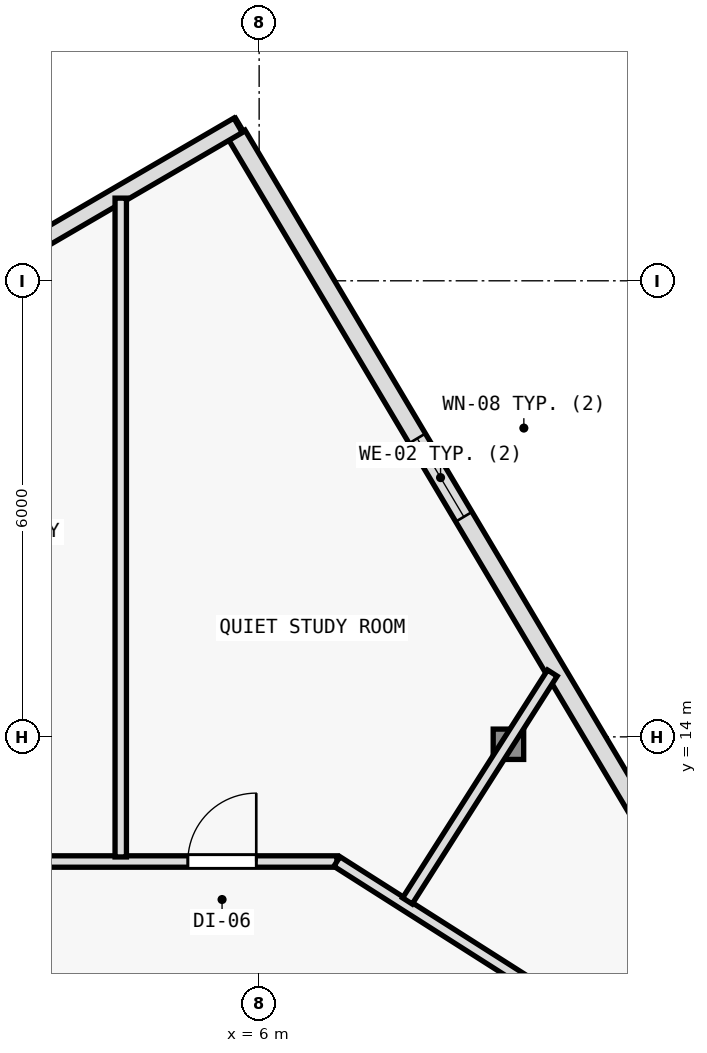
"""IFC4 building model, lengths in metres.
Left out: names, types, materials, properties, quantities, classifications, styles, units other than length and angle.
Written with IfcOpenShell. Run it as: python <this file> out.ifc"""

import sys

from ifc_helpers import new_model, si_unit, direction, frame, frame_2d, origin, origin_2d, place, context, subcontext, project, spatial, rectangle, i_section, extrude, element, fill, save


model = new_model("IFC4")
c1 = context("Model", 3, precision=1e-05, world=origin(), true_north=direction((0.0, 1.0)))
c2 = subcontext(c1, "Body", "Model", "MODEL_VIEW")
j1 = project(units=[si_unit("LENGTHUNIT", "METRE"), si_unit("PLANEANGLEUNIT", "RADIAN")], contexts=[c1])
p1 = place(None, origin())
s1 = spatial("IfcSite", under=j1, at=p1, CompositionType="ELEMENT")
p2 = place(p1, origin())
s2 = spatial("IfcBuilding", under=s1, at=p2, CompositionType="ELEMENT")
p3 = place(p2, frame((0.0, 0.0, 167.4)))
s3 = spatial("IfcBuildingStorey", under=s2, at=p3, CompositionType="ELEMENT", Elevation=167.4)
p4 = place(p3, frame((9.28, 13.903, 0.006), z_axis=(-0.011699840322, -0.002584848443, 0.999928213571), x_axis=(0.215728093413, -0.976453475447, 0.0)))
e1 = element("IfcColumn", 1, at=p4, inside=s3, PredefinedType="COLUMN", context=c2, shape_type="SweptSolid", body=[
    extrude(i_section(OverallWidth=0.401, OverallDepth=0.399, WebThickness=0.016, FlangeThickness=0.025, FilletRadius=0.015, at=origin_2d()), origin(), (0.0, 0.0, 1.0), 3.589),
])
p5 = place(p3, frame((5.706, 21.919, 0.0), z_axis=(0.0, 0.0, 1.0), x_axis=(0.511079110892, -0.859533677298, 0.0)))
e2 = element("IfcWall", 2, at=p5, inside=s3, PredefinedType="SOLIDWALL", context=c2, shape_type="SweptSolid", body=[
    extrude(rectangle(XDim=10.489, YDim=0.25, at=frame_2d((5.245, 0.0))), origin(), (0.0, 0.0, 1.0), 3.35),
])
p6 = place(p5, frame((4.645, 0.0, 0.62)))
e3 = element("IfcOpeningElement", 3, at=p6, cuts=e2, PredefinedType="OPENING", context=c2, shape_type="SweptSolid", body=[
    extrude(rectangle(XDim=1.2, YDim=1.8, at=frame_2d((0.6, 0.9))), frame((0.0, 0.135, 0.0), z_axis=(0.0, -1.0, 0.0), x_axis=(1.0, 0.0, 0.0)), (0.0, 0.0, 1.0), 0.27),
])
p7 = place(p3, frame((1.987, 19.868, 0.0), z_axis=(0.0, 0.0, 1.0), x_axis=(0.863979520686, 0.503526948469, 0.0)))
e4 = element("IfcWall", 4, at=p7, inside=s3, PredefinedType="SOLIDWALL", context=c2, shape_type="SweptSolid", body=[
    extrude(rectangle(XDim=4.324, YDim=0.22, at=frame_2d((2.162, 0.0))), origin(), (0.0, 0.0, 1.0), 3.35),
])
p8 = place(p3, frame((-7.041, 12.36, 0.0), z_axis=(0.0, 0.0, 1.0), x_axis=(1.0, 0.0, 0.0)))
e5 = element("IfcWall", 5, at=p8, inside=s3, PredefinedType="PARTITIONING", context=c2, shape_type="SweptSolid", body=[
    extrude(rectangle(XDim=14.064, YDim=0.15, at=frame_2d((7.032, 0.0))), origin(), (0.0, 0.0, 1.0), 2.965),
])
p9 = place(p8, frame((12.103, 0.0, 0.0)))
e6 = element("IfcOpeningElement", 6, at=p9, cuts=e5, PredefinedType="OPENING", context=c2, shape_type="SweptSolid", body=[
    extrude(rectangle(XDim=0.9, YDim=2.1, at=frame_2d((0.45, 1.05))), frame((0.0, 0.085, 0.0), z_axis=(0.0, -1.0, 0.0), x_axis=(1.0, 0.0, 0.0)), (0.0, 0.0, 1.0), 0.17),
])
p10 = place(p8, frame((9.136, 0.0, 0.0)))
e7 = element("IfcOpeningElement", 7, at=p10, cuts=e5, PredefinedType="OPENING", context=c2, shape_type="SweptSolid", body=[
    extrude(rectangle(XDim=0.9, YDim=2.1, at=frame_2d((0.45, 1.05))), frame((0.0, 0.085, 0.0), z_axis=(0.0, -1.0, 0.0), x_axis=(1.0, 0.0, 0.0)), (0.0, 0.0, 1.0), 0.17),
])
p11 = place(p8, frame((6.198, 0.0, 0.0)))
e8 = element("IfcOpeningElement", 8, at=p11, cuts=e5, PredefinedType="OPENING", context=c2, shape_type="SweptSolid", body=[
    extrude(rectangle(XDim=0.9, YDim=2.1, at=frame_2d((0.45, 1.05))), frame((0.0, 0.085, 0.0), z_axis=(0.0, -1.0, 0.0), x_axis=(1.0, 0.0, 0.0)), (0.0, 0.0, 1.0), 0.17),
])
p12 = place(p8, frame((2.357, 0.0, 0.0)))
e9 = element("IfcOpeningElement", 9, at=p12, cuts=e5, PredefinedType="OPENING", context=c2, shape_type="SweptSolid", body=[
    extrude(rectangle(XDim=0.9, YDim=2.1, at=frame_2d((0.45, 1.05))), frame((0.0, 0.085, 0.0), z_axis=(0.0, -1.0, 0.0), x_axis=(1.0, 0.0, 0.0)), (0.0, 0.0, 1.0), 0.17),
])
p13 = place(p3, frame((7.023, 12.36, 0.0), z_axis=(0.0, 0.0, 1.0), x_axis=(0.84376480085, -0.536713108511, 0.0)))
e10 = element("IfcWall", 10, at=p13, inside=s3, PredefinedType="PARTITIONING", context=c2, shape_type="SweptSolid", body=[
    extrude(rectangle(XDim=7.297, YDim=0.15, at=frame_2d((3.648, 0.0))), origin(), (0.0, 0.0, 1.0), 2.935),
])
p14 = place(p3, frame((7.951, 11.841, 0.0), z_axis=(0.0, 0.0, 1.0), x_axis=(0.536702086474, 0.843771811792, 0.0)))
e11 = element("IfcWall", 11, at=p14, inside=s3, PredefinedType="PARTITIONING", context=c2, shape_type="SweptSolid", body=[
    extrude(rectangle(XDim=3.553, YDim=0.15, at=frame_2d((1.777, 0.0))), origin(), (0.0, 0.0, 1.0), 2.935),
])
p15 = place(p3, frame((4.179, 12.42, 0.0), z_axis=(0.0, 0.0, 1.0), x_axis=(0.0, 1.0, 0.0)))
e12 = element("IfcWall", 12, at=p15, inside=s3, PredefinedType="PARTITIONING", context=c2, shape_type="SweptSolid", body=[
    extrude(rectangle(XDim=8.667, YDim=0.15, at=frame_2d((4.334, 0.0))), origin(), (0.0, 0.0, 1.0), 2.935),
])
p16 = place(p6, origin())
e13 = element("IfcWindow", 13, at=p16, inside=s3, PartitioningType="SINGLE_PANEL", PredefinedType="WINDOW", context=c2, shape_type="SweptSolid", body=[
    extrude(rectangle(XDim=1.2, YDim=1.8, at=frame_2d((0.6, 0.9))), frame((0.0, 0.03, 0.0), z_axis=(0.0, -1.0, 0.0), x_axis=(1.0, 0.0, 0.0)), (0.0, 0.0, 1.0), 0.06),
])
fill(e3, e13)
p17 = place(p9, origin())
e14 = element("IfcDoor", 14, at=p17, inside=s3, OperationType="SINGLE_SWING_RIGHT", PredefinedType="DOOR", context=c2, shape_type="SweptSolid", body=[
    extrude(rectangle(XDim=0.9, YDim=2.1, at=frame_2d((0.45, 1.05))), frame((0.0, 0.025, 0.0), z_axis=(0.0, -1.0, 0.0), x_axis=(1.0, 0.0, 0.0)), (0.0, 0.0, 1.0), 0.05),
])
fill(e6, e14)
save(model, sys.argv[1])
